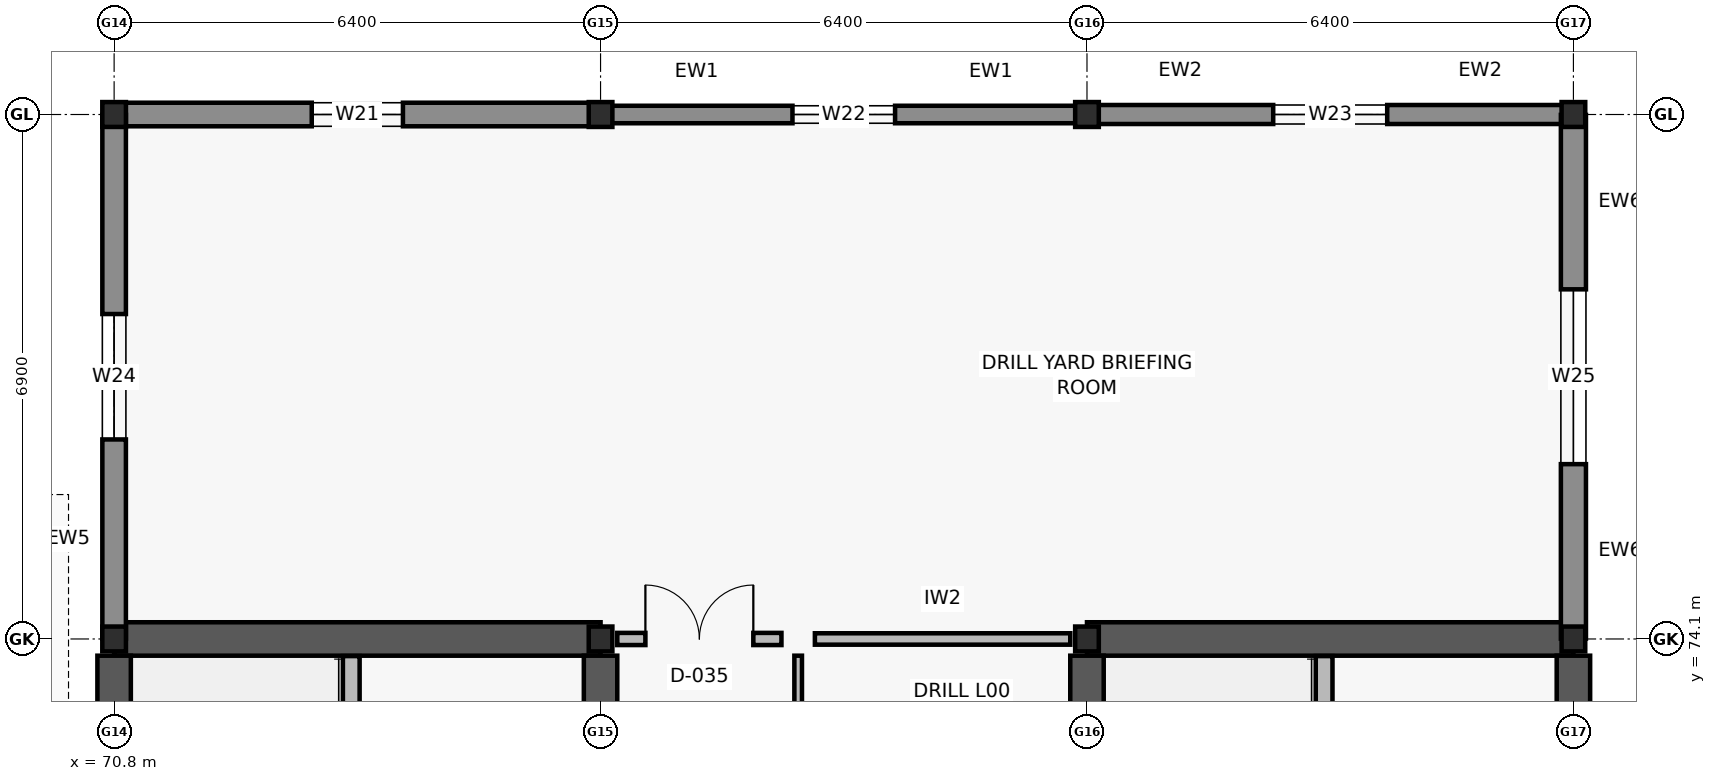
"""IFC4 building model, lengths in metres.
Left out: names, types, materials, properties, quantities, classifications, styles, units other than length and angle.
Written with IfcOpenShell. Run it as: python <this file> out.ifc"""

import sys

from ifc_helpers import new_model, si_unit, direction, frame, frame_2d, origin, origin_2d, place, context, subcontext, project, spatial, rectangle, i_section, extrude, element, fill, save


model = new_model("IFC4")
c1 = context("Model", 3, precision=1e-05, world=origin(), true_north=direction((0.0, 1.0)))
c2 = subcontext(c1, "Body", "Model", "MODEL_VIEW")
j1 = project(units=[si_unit("LENGTHUNIT", "METRE"), si_unit("PLANEANGLEUNIT", "RADIAN")], contexts=[c1])
p1 = place(None, origin())
s1 = spatial("IfcSite", under=j1, at=p1, CompositionType="ELEMENT")
p2 = place(p1, origin())
s2 = spatial("IfcBuilding", under=s1, at=p2, CompositionType="ELEMENT")
p3 = place(p2, origin())
s3 = spatial("IfcBuildingStorey", under=s2, at=p3, CompositionType="ELEMENT", Elevation=0.0)
for number, where, z_axis, x_axis in (
    (1, (70.8, 74.1, 0.0), (0.0, 0.0, 1.0), (1.0, 0.0, 0.0)),
    (2, (70.8, 81.0, 0.0), (0.0, 0.0, 1.0), (1.0, 0.0, 0.0)),
    (3, (77.2, 74.1, 0.0), (0.0, 0.0, 1.0), (1.0, 0.0, 0.0)),
    (4, (77.2, 81.0, 0.0), (0.0, 0.0, 1.0), (1.0, 0.0, 0.0)),
    (5, (83.6, 74.1, 0.0), (0.0, 0.0, 1.0), (1.0, 0.0, 0.0)),
    (6, (83.6, 81.0, 0.0), (0.0, 0.0, 1.0), (1.0, 0.0, 0.0)),
    (7, (90.0, 74.1, 0.0), (0.0, 0.0, 1.0), (1.0, 0.0, 0.0)),
    (8, (90.0, 81.0, 0.0), (0.0, 0.0, 1.0), (1.0, 0.0, 0.0)),
):
    element("IfcColumn", number, at=place(p3, frame(where, z_axis=z_axis, x_axis=x_axis)), inside=s3, PredefinedType="COLUMN", context=c2, shape_type="SweptSolid", body=[
        extrude(i_section(OverallWidth=0.311, OverallDepth=0.327, WebThickness=0.016, FlangeThickness=0.025, FilletRadius=0.017, at=origin_2d()), origin(), (0.0, 0.0, 1.0), 5.4),
    ])
p4 = place(p3, frame((70.8, 74.1, 0.0), z_axis=(0.0, 0.0, 1.0), x_axis=(1.0, 0.0, 0.0)))
e9 = element("IfcWall", 9, at=p4, inside=s3, PredefinedType="SHEAR", context=c2, shape_type="SweptSolid", body=[
    extrude(rectangle(XDim=6.4, YDim=0.44, at=frame_2d((3.2, 0.0))), origin(), (0.0, 0.0, 1.0), 5.16),
])
for number, where, z_axis, x_axis in (
    (10, (70.8, 67.2, 0.0), (0.0, 0.0, 1.0), (0.0, 1.0, 0.0)),
    (11, (77.2, 67.2, 0.0), (0.0, 0.0, 1.0), (0.0, 1.0, 0.0)),
):
    element("IfcWall", number, at=place(p3, frame(where, z_axis=z_axis, x_axis=x_axis)), inside=s3, PredefinedType="SHEAR", context=c2, shape_type="SweptSolid", body=[
        extrude(rectangle(XDim=6.68, YDim=0.44, at=frame_2d((3.34, 0.0))), origin(), (0.0, 0.0, 1.0), 5.16),
    ])
p5 = place(p3, frame((83.6, 74.1, 0.0), z_axis=(0.0, 0.0, 1.0), x_axis=(1.0, 0.0, 0.0)))
e12 = element("IfcWall", 12, at=p5, inside=s3, PredefinedType="SHEAR", context=c2, shape_type="SweptSolid", body=[
    extrude(rectangle(XDim=6.4, YDim=0.44, at=frame_2d((3.2, 0.0))), origin(), (0.0, 0.0, 1.0), 5.16),
])
for number, where, z_axis, x_axis in (
    (13, (83.6, 67.2, 0.0), (0.0, 0.0, 1.0), (0.0, 1.0, 0.0)),
    (14, (90.0, 67.2, 0.0), (0.0, 0.0, 1.0), (0.0, 1.0, 0.0)),
):
    element("IfcWall", number, at=place(p3, frame(where, z_axis=z_axis, x_axis=x_axis)), inside=s3, PredefinedType="SHEAR", context=c2, shape_type="SweptSolid", body=[
        extrude(rectangle(XDim=6.68, YDim=0.44, at=frame_2d((3.34, 0.0))), origin(), (0.0, 0.0, 1.0), 5.16),
    ])
p6 = place(p3, frame((70.805, 81.0, 0.0), z_axis=(0.0, 0.0, 1.0), x_axis=(1.0, 0.0, 0.0)))
e15 = element("IfcWall", 15, at=p6, inside=s3, PredefinedType="SOLIDWALL", context=c2, shape_type="SweptSolid", body=[
    extrude(rectangle(XDim=6.39, YDim=0.31, at=frame_2d((3.195, 0.0))), origin(), (0.0, 0.0, 1.0), 4.52),
])
p7 = place(p6, frame((2.595, 0.0, 0.8)))
e16 = element("IfcOpeningElement", 16, at=p7, cuts=e15, PredefinedType="OPENING", context=c2, shape_type="SweptSolid", body=[
    extrude(rectangle(XDim=1.2, YDim=2.05, at=frame_2d((0.6, 1.025))), frame((0.0, 0.165, 0.0), z_axis=(0.0, -1.0, 0.0), x_axis=(1.0, 0.0, 0.0)), (0.0, 0.0, 1.0), 0.33),
])
p8 = place(p3, frame((77.205, 81.0, 0.0), z_axis=(0.0, 0.0, 1.0), x_axis=(1.0, 0.0, 0.0)))
e17 = element("IfcWall", 17, at=p8, inside=s3, PredefinedType="SOLIDWALL", context=c2, shape_type="SweptSolid", body=[
    extrude(rectangle(XDim=6.39, YDim=0.23, at=frame_2d((3.195, 0.0))), origin(), (0.0, 0.0, 1.0), 4.52),
])
p9 = place(p8, frame((2.52, 0.0, 0.8)))
e18 = element("IfcOpeningElement", 18, at=p9, cuts=e17, PredefinedType="OPENING", context=c2, shape_type="SweptSolid", body=[
    extrude(rectangle(XDim=1.35, YDim=2.05, at=frame_2d((0.675, 1.025))), frame((0.0, 0.125, 0.0), z_axis=(0.0, -1.0, 0.0), x_axis=(1.0, 0.0, 0.0)), (0.0, 0.0, 1.0), 0.25),
])
p10 = place(p3, frame((83.605, 81.0, 0.0), z_axis=(0.0, 0.0, 1.0), x_axis=(1.0, 0.0, 0.0)))
e19 = element("IfcWall", 19, at=p10, inside=s3, PredefinedType="SOLIDWALL", context=c2, shape_type="SweptSolid", body=[
    extrude(rectangle(XDim=6.39, YDim=0.25, at=frame_2d((3.195, 0.0))), origin(), (0.0, 0.0, 1.0), 4.52),
])
p11 = place(p10, frame((2.445, 0.0, 0.8)))
e20 = element("IfcOpeningElement", 20, at=p11, cuts=e19, PredefinedType="OPENING", context=c2, shape_type="SweptSolid", body=[
    extrude(rectangle(XDim=1.5, YDim=2.05, at=frame_2d((0.75, 1.025))), frame((0.0, 0.135, 0.0), z_axis=(0.0, -1.0, 0.0), x_axis=(1.0, 0.0, 0.0)), (0.0, 0.0, 1.0), 0.27),
])
p12 = place(p3, frame((70.8, 74.105, 0.0), z_axis=(0.0, 0.0, 1.0), x_axis=(0.0, 1.0, 0.0)))
e21 = element("IfcWall", 21, at=p12, inside=s3, PredefinedType="SOLIDWALL", context=c2, shape_type="SweptSolid", body=[
    extrude(rectangle(XDim=6.89, YDim=0.31, at=frame_2d((3.445, 0.0))), origin(), (0.0, 0.0, 1.0), 4.52),
])
p13 = place(p12, frame((2.62, 0.0, 0.8)))
e22 = element("IfcOpeningElement", 22, at=p13, cuts=e21, PredefinedType="OPENING", context=c2, shape_type="SweptSolid", body=[
    extrude(rectangle(XDim=1.65, YDim=2.05, at=frame_2d((0.825, 1.025))), frame((0.0, 0.165, 0.0), z_axis=(0.0, -1.0, 0.0), x_axis=(1.0, 0.0, 0.0)), (0.0, 0.0, 1.0), 0.33),
])
p14 = place(p3, frame((90.0, 80.995, 0.0), z_axis=(0.0, 0.0, 1.0), x_axis=(0.0, -1.0, 0.0)))
e23 = element("IfcWall", 23, at=p14, inside=s3, PredefinedType="SOLIDWALL", context=c2, shape_type="SweptSolid", body=[
    extrude(rectangle(XDim=6.89, YDim=0.33, at=frame_2d((3.445, 0.0))), origin(), (0.0, 0.0, 1.0), 4.52),
])
p15 = place(p14, frame((2.295, 0.0, 0.8)))
e24 = element("IfcOpeningElement", 24, at=p15, cuts=e23, PredefinedType="OPENING", context=c2, shape_type="SweptSolid", body=[
    extrude(rectangle(XDim=2.3, YDim=1.15, at=frame_2d((1.15, 0.575))), frame((0.0, 0.175, 0.0), z_axis=(0.0, -1.0, 0.0), x_axis=(1.0, 0.0, 0.0)), (0.0, 0.0, 1.0), 0.35),
])
for number, where, z_axis, x_axis in (
    (25, (73.92, 67.32, 0.0), (0.0, 0.0, 1.0), (0.0, 1.0, 0.0)),
    (26, (86.72, 67.32, 0.0), (0.0, 0.0, 1.0), (0.0, 1.0, 0.0)),
):
    element("IfcWall", number, at=place(p3, frame(where, z_axis=z_axis, x_axis=x_axis)), inside=s3, PredefinedType="SOLIDWALL", context=c2, shape_type="SweptSolid", body=[
        extrude(rectangle(XDim=6.555, YDim=0.22, at=frame_2d((3.277, 0.0))), origin(), (0.0, 0.0, 1.0), 5.16),
    ])
p16 = place(p3, frame((79.8, 67.42, 0.0), z_axis=(0.0, 0.0, 1.0), x_axis=(0.0, 1.0, 0.0)))
e27 = element("IfcWall", 27, at=p16, inside=s3, PredefinedType="PARTITIONING", context=c2, shape_type="SweptSolid", body=[
    extrude(rectangle(XDim=6.46, YDim=0.1, at=frame_2d((3.23, 0.0))), origin(), (0.0, 0.0, 1.0), 4.5),
])
p17 = place(p16, frame((2.55, 0.0, 0.0)))
e28 = element("IfcOpeningElement", 28, at=p17, cuts=e27, PredefinedType="OPENING", context=c2, shape_type="SweptSolid", body=[
    extrude(rectangle(XDim=1.36, YDim=2.15, at=frame_2d((0.68, 1.075))), frame((0.0, 0.06, 0.0), z_axis=(0.0, -1.0, 0.0), x_axis=(1.0, 0.0, 0.0)), (0.0, 0.0, 1.0), 0.12),
])
p18 = place(p3, frame((77.42, 74.1, 0.0), z_axis=(0.0, 0.0, 1.0), x_axis=(1.0, 0.0, 0.0)))
e29 = element("IfcWall", 29, at=p18, inside=s3, PredefinedType="PARTITIONING", context=c2, shape_type="SweptSolid", body=[
    extrude(rectangle(XDim=2.16, YDim=0.16, at=frame_2d((1.08, 0.0))), origin(), (0.0, 0.0, 1.0), 4.5),
])
p19 = place(p18, frame((0.37, 0.0, 0.0)))
e30 = element("IfcOpeningElement", 30, at=p19, cuts=e29, PredefinedType="OPENING", context=c2, shape_type="SweptSolid", body=[
    extrude(rectangle(XDim=1.42, YDim=2.15, at=frame_2d((0.71, 1.075))), frame((0.0, 0.09, 0.0), z_axis=(0.0, -1.0, 0.0), x_axis=(1.0, 0.0, 0.0)), (0.0, 0.0, 1.0), 0.18),
])
p20 = place(p3, frame((80.02, 74.1, 0.0), z_axis=(0.0, 0.0, 1.0), x_axis=(1.0, 0.0, 0.0)))
e31 = element("IfcWall", 31, at=p20, inside=s3, PredefinedType="PARTITIONING", context=c2, shape_type="SweptSolid", body=[
    extrude(rectangle(XDim=3.36, YDim=0.15, at=frame_2d((1.68, 0.0))), origin(), (0.0, 0.0, 1.0), 4.5),
])
p21 = place(p7, origin())
e32 = element("IfcWindow", 32, at=p21, inside=s3, PartitioningType="SINGLE_PANEL", PredefinedType="WINDOW", context=c2, shape_type="SweptSolid", body=[
    extrude(rectangle(XDim=1.2, YDim=2.05, at=frame_2d((0.6, 1.025))), frame((0.0, 0.03, 0.0), z_axis=(0.0, -1.0, 0.0), x_axis=(1.0, 0.0, 0.0)), (0.0, 0.0, 1.0), 0.06),
])
fill(e16, e32)
p22 = place(p9, origin())
e33 = element("IfcWindow", 33, at=p22, inside=s3, PartitioningType="SINGLE_PANEL", PredefinedType="WINDOW", context=c2, shape_type="SweptSolid", body=[
    extrude(rectangle(XDim=1.35, YDim=2.05, at=frame_2d((0.675, 1.025))), frame((0.0, 0.03, 0.0), z_axis=(0.0, -1.0, 0.0), x_axis=(1.0, 0.0, 0.0)), (0.0, 0.0, 1.0), 0.06),
])
fill(e18, e33)
p23 = place(p11, origin())
e34 = element("IfcWindow", 34, at=p23, inside=s3, PartitioningType="SINGLE_PANEL", PredefinedType="WINDOW", context=c2, shape_type="SweptSolid", body=[
    extrude(rectangle(XDim=1.5, YDim=2.05, at=frame_2d((0.75, 1.025))), frame((0.0, 0.03, 0.0), z_axis=(0.0, -1.0, 0.0), x_axis=(1.0, 0.0, 0.0)), (0.0, 0.0, 1.0), 0.06),
])
fill(e20, e34)
p24 = place(p13, origin())
e35 = element("IfcWindow", 35, at=p24, inside=s3, PartitioningType="DOUBLE_PANEL_VERTICAL", PredefinedType="WINDOW", context=c2, shape_type="SweptSolid", body=[
    extrude(rectangle(XDim=1.65, YDim=2.05, at=frame_2d((0.825, 1.025))), frame((0.0, 0.03, 0.0), z_axis=(0.0, -1.0, 0.0), x_axis=(1.0, 0.0, 0.0)), (0.0, 0.0, 1.0), 0.06),
])
fill(e22, e35)
p25 = place(p15, origin())
e36 = element("IfcWindow", 36, at=p25, inside=s3, PartitioningType="DOUBLE_PANEL_VERTICAL", PredefinedType="WINDOW", context=c2, shape_type="SweptSolid", body=[
    extrude(rectangle(XDim=2.3, YDim=1.15, at=frame_2d((1.15, 0.575))), frame((0.0, 0.03, 0.0), z_axis=(0.0, -1.0, 0.0), x_axis=(1.0, 0.0, 0.0)), (0.0, 0.0, 1.0), 0.06),
])
fill(e24, e36)
p26 = place(p19, origin())
e37 = element("IfcDoor", 37, at=p26, inside=s3, OperationType="DOUBLE_DOOR_SINGLE_SWING", PredefinedType="DOOR", context=c2, shape_type="SweptSolid", body=[
    extrude(rectangle(XDim=1.42, YDim=2.15, at=frame_2d((0.71, 1.075))), frame((0.0, 0.025, 0.0), z_axis=(0.0, -1.0, 0.0), x_axis=(1.0, 0.0, 0.0)), (0.0, 0.0, 1.0), 0.05),
])
fill(e30, e37)
save(model, sys.argv[1])
